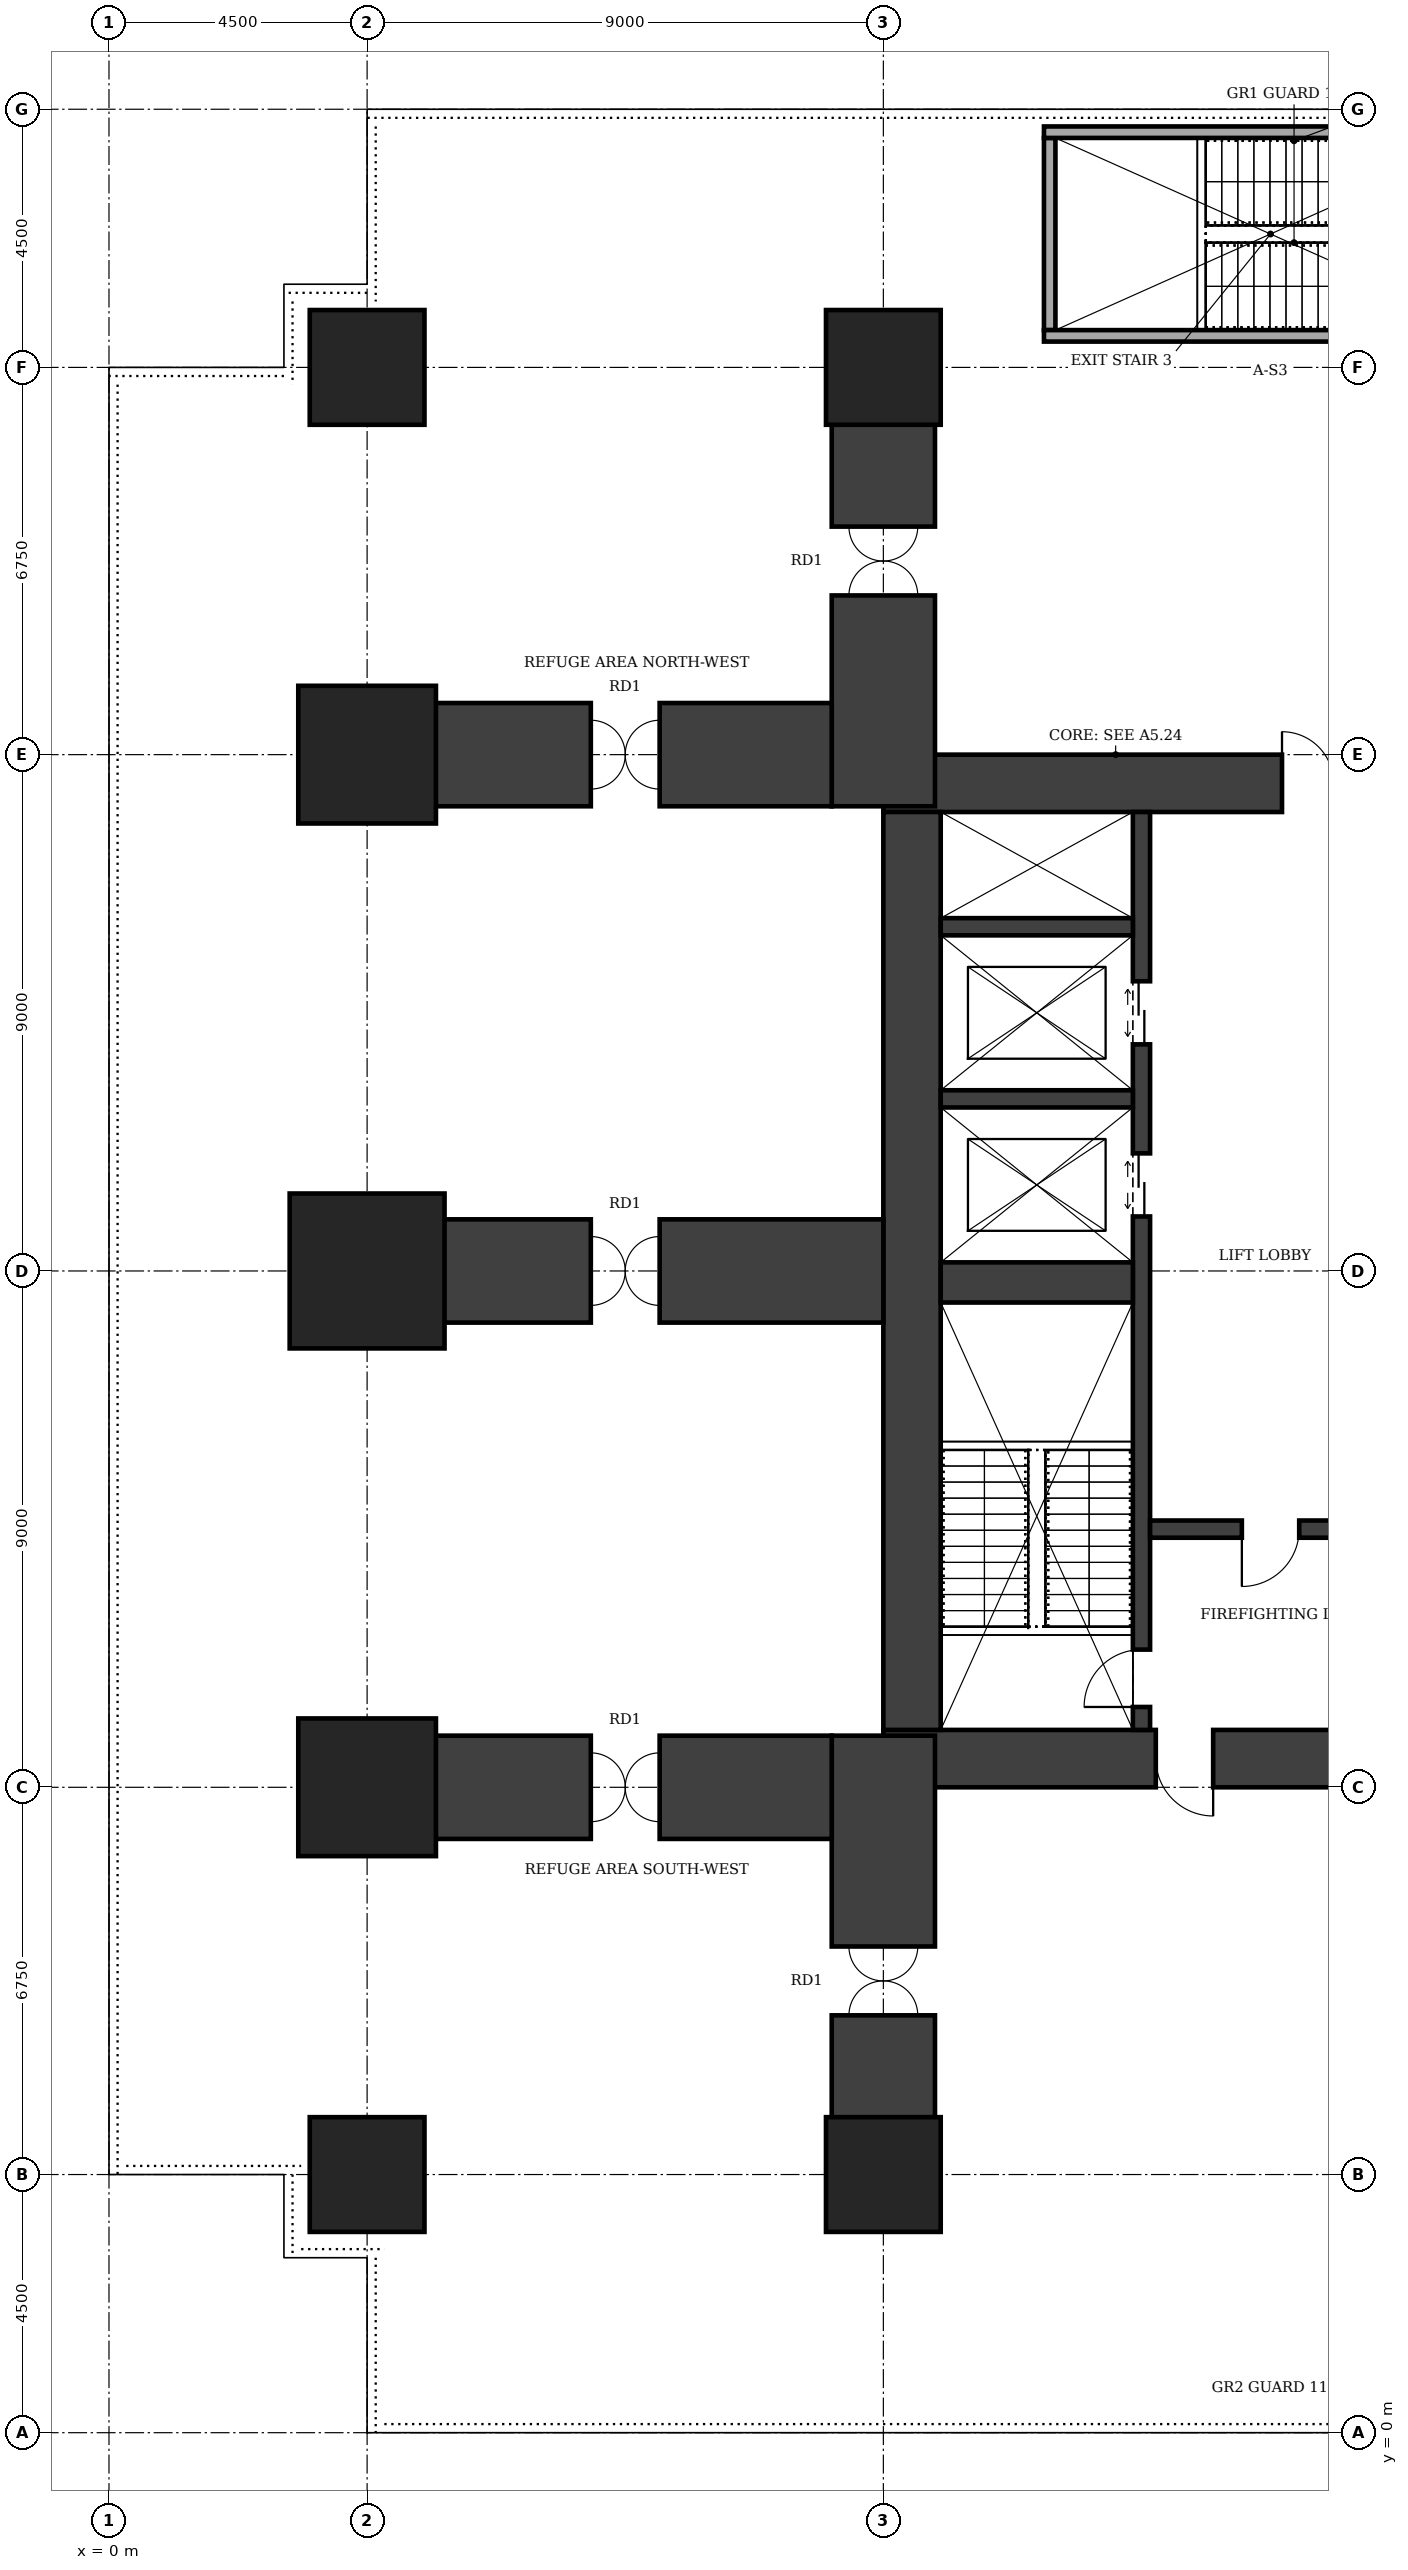
"""IFC4 building model, lengths in metres.
Left out: names, types, materials, properties, quantities, classifications, styles, units other than length and angle.
Written with IfcOpenShell. Run it as: python <this file> out.ifc"""

import sys

from ifc_helpers import new_model, si_unit, direction, frame, frame_2d, origin, origin_2d, place, context, subcontext, project, spatial, rectangle, extrude, element, fill, save


model = new_model("IFC4")
c1 = context("Model", 3, precision=1e-05, world=origin(), true_north=direction((0.0, 1.0)))
c2 = subcontext(c1, "Body", "Model", "MODEL_VIEW")
j1 = project(units=[si_unit("LENGTHUNIT", "METRE"), si_unit("PLANEANGLEUNIT", "RADIAN")], contexts=[c1])
p1 = place(None, origin())
s1 = spatial("IfcSite", under=j1, at=p1, CompositionType="ELEMENT")
p2 = place(p1, origin())
s2 = spatial("IfcBuilding", under=s1, at=p2, CompositionType="ELEMENT")
p3 = place(p2, frame((0.0, 0.0, 77.0)))
s3 = spatial("IfcBuildingStorey", under=s2, at=p3, CompositionType="ELEMENT", Elevation=77.0)
p4 = place(p3, frame((13.5, 11.75, 0.0), z_axis=(0.0, 0.0, 1.0), x_axis=(1.0, 0.0, 0.0)))
e1 = element("IfcWall", 1, at=p4, inside=s3, PredefinedType="SHEAR", context=c2, shape_type="SweptSolid", body=[
    extrude(rectangle(XDim=13.5, YDim=1.0, at=frame_2d((6.75, 0.0))), origin(), (0.0, 0.0, 1.0), 8.0),
])
p5 = place(p4, frame((4.75, 0.0, 0.0)))
e2 = element("IfcOpeningElement", 2, at=p5, cuts=e1, PredefinedType="OPENING", context=c2, shape_type="SweptSolid", body=[
    extrude(rectangle(XDim=1.0, YDim=2.1, at=frame_2d((0.5, 1.05))), frame((0.0, 0.51, 0.0), z_axis=(0.0, -1.0, 0.0), x_axis=(1.0, 0.0, 0.0)), (0.0, 0.0, 1.0), 1.02),
])
p6 = place(p3, frame((27.0, 28.75, 0.0), z_axis=(0.0, 0.0, 1.0), x_axis=(-1.0, 0.0, 0.0)))
e3 = element("IfcWall", 3, at=p6, inside=s3, PredefinedType="SHEAR", context=c2, shape_type="SweptSolid", body=[
    extrude(rectangle(XDim=13.5, YDim=1.0, at=frame_2d((6.75, 0.0))), origin(), (0.0, 0.0, 1.0), 8.0),
])
p7 = place(p6, frame((4.75, 0.0, 0.0)))
e4 = element("IfcOpeningElement", 4, at=p7, cuts=e3, PredefinedType="OPENING", context=c2, shape_type="SweptSolid", body=[
    extrude(rectangle(XDim=1.8, YDim=2.1, at=frame_2d((0.9, 1.05))), frame((0.0, 0.51, 0.0), z_axis=(0.0, -1.0, 0.0), x_axis=(1.0, 0.0, 0.0)), (0.0, 0.0, 1.0), 1.02),
])
p8 = place(p3, frame((14.0, 28.25, 0.0), z_axis=(0.0, 0.0, 1.0), x_axis=(0.0, -1.0, 0.0)))
e5 = element("IfcWall", 5, at=p8, inside=s3, PredefinedType="SHEAR", context=c2, shape_type="SweptSolid", body=[
    extrude(rectangle(XDim=16.0, YDim=1.0, at=frame_2d((8.0, 0.0))), origin(), (0.0, 0.0, 1.0), 8.0),
])
p9 = place(p3, frame((18.0, 12.25, 0.0), z_axis=(0.0, 0.0, 1.0), x_axis=(0.0, 1.0, 0.0)))
e6 = element("IfcWall", 6, at=p9, inside=s3, PredefinedType="SHEAR", context=c2, shape_type="SweptSolid", body=[
    extrude(rectangle(XDim=16.0, YDim=0.3, at=frame_2d((8.0, 0.0))), origin(), (0.0, 0.0, 1.0), 8.0),
])
p10 = place(p9, frame((0.4, 0.0, 0.0)))
e7 = element("IfcOpeningElement", 7, at=p10, cuts=e6, PredefinedType="OPENING", context=c2, shape_type="SweptSolid", body=[
    extrude(rectangle(XDim=1.0, YDim=2.1, at=frame_2d((0.5, 1.05))), frame((0.0, 0.16, 0.0), z_axis=(0.0, -1.0, 0.0), x_axis=(1.0, 0.0, 0.0)), (0.0, 0.0, 1.0), 0.32),
])
p11 = place(p9, frame((8.95, 0.0, 0.0)))
e8 = element("IfcOpeningElement", 8, at=p11, cuts=e6, PredefinedType="OPENING", context=c2, shape_type="SweptSolid", body=[
    extrude(rectangle(XDim=1.1, YDim=2.1, at=frame_2d((0.55, 1.05))), frame((0.0, 0.16, 0.0), z_axis=(0.0, -1.0, 0.0), x_axis=(1.0, 0.0, 0.0)), (0.0, 0.0, 1.0), 0.32),
])
p12 = place(p9, frame((11.95, 0.0, 0.0)))
e9 = element("IfcOpeningElement", 9, at=p12, cuts=e6, PredefinedType="OPENING", context=c2, shape_type="SweptSolid", body=[
    extrude(rectangle(XDim=1.1, YDim=2.1, at=frame_2d((0.55, 1.05))), frame((0.0, 0.16, 0.0), z_axis=(0.0, -1.0, 0.0), x_axis=(1.0, 0.0, 0.0)), (0.0, 0.0, 1.0), 0.32),
])
p13 = place(p3, frame((14.5, 20.05, 0.0), z_axis=(0.0, 0.0, 1.0), x_axis=(1.0, 0.0, 0.0)))
e10 = element("IfcWall", 10, at=p13, inside=s3, PredefinedType="SHEAR", context=c2, shape_type="SweptSolid", body=[
    extrude(rectangle(XDim=3.35, YDim=0.7, at=frame_2d((1.675, 0.0))), origin(), (0.0, 0.0, 1.0), 8.0),
])
p14 = place(p3, frame((18.15, 15.75, 0.0), z_axis=(0.0, 0.0, 1.0), x_axis=(1.0, 0.0, 0.0)))
e11 = element("IfcWall", 11, at=p14, inside=s3, PredefinedType="SHEAR", context=c2, shape_type="SweptSolid", body=[
    extrude(rectangle(XDim=4.2, YDim=0.3, at=frame_2d((2.1, 0.0))), origin(), (0.0, 0.0, 1.0), 8.0),
])
p15 = place(p14, frame((1.6, 0.0, 0.0)))
e12 = element("IfcOpeningElement", 12, at=p15, cuts=e11, PredefinedType="OPENING", context=c2, shape_type="SweptSolid", body=[
    extrude(rectangle(XDim=1.0, YDim=2.1, at=frame_2d((0.5, 1.05))), frame((0.0, 0.16, 0.0), z_axis=(0.0, -1.0, 0.0), x_axis=(1.0, 0.0, 0.0)), (0.0, 0.0, 1.0), 0.32),
])
for number, where, z_axis, x_axis in (
    (13, (14.5, 23.25, 0.0), (0.0, 0.0, 1.0), (1.0, 0.0, 0.0)),
    (14, (14.5, 26.25, 0.0), (0.0, 0.0, 1.0), (1.0, 0.0, 0.0)),
):
    element("IfcWall", number, at=place(p3, frame(where, z_axis=z_axis, x_axis=x_axis)), inside=s3, PredefinedType="SHEAR", context=c2, shape_type="SweptSolid", body=[
        extrude(rectangle(XDim=3.35, YDim=0.3, at=frame_2d((1.675, 0.0))), origin(), (0.0, 0.0, 1.0), 8.0),
    ])
for number, where, z_axis, x_axis in (
    (15, (4.5, 4.5, 0.0), (0.0, 0.0, 1.0), (1.0, 0.0, 0.0)),
    (16, (13.5, 4.5, 0.0), (0.0, 0.0, 1.0), (1.0, 0.0, 0.0)),
):
    element("IfcColumn", number, at=place(p3, frame(where, z_axis=z_axis, x_axis=x_axis)), inside=s3, PredefinedType="COLUMN", context=c2, shape_type="SweptSolid", body=[
        extrude(rectangle(XDim=2.0, YDim=2.0, at=origin_2d()), origin(), (0.0, 0.0, 1.0), 8.0),
    ])
p16 = place(p3, frame((4.5, 11.25, 0.0), z_axis=(0.0, 0.0, 1.0), x_axis=(1.0, 0.0, 0.0)))
e17 = element("IfcColumn", 17, at=p16, inside=s3, PredefinedType="COLUMN", context=c2, shape_type="SweptSolid", body=[
    extrude(rectangle(XDim=2.4, YDim=2.4, at=origin_2d()), origin(), (0.0, 0.0, 1.0), 8.0),
])
p17 = place(p3, frame((4.5, 20.25, 0.0), z_axis=(0.0, 0.0, 1.0), x_axis=(1.0, 0.0, 0.0)))
e18 = element("IfcColumn", 18, at=p17, inside=s3, PredefinedType="COLUMN", context=c2, shape_type="SweptSolid", body=[
    extrude(rectangle(XDim=2.7, YDim=2.7, at=origin_2d()), origin(), (0.0, 0.0, 1.0), 8.0),
])
p18 = place(p3, frame((4.5, 29.25, 0.0), z_axis=(0.0, 0.0, 1.0), x_axis=(1.0, 0.0, 0.0)))
e19 = element("IfcColumn", 19, at=p18, inside=s3, PredefinedType="COLUMN", context=c2, shape_type="SweptSolid", body=[
    extrude(rectangle(XDim=2.4, YDim=2.4, at=origin_2d()), origin(), (0.0, 0.0, 1.0), 8.0),
])
for number, where, z_axis, x_axis in (
    (20, (4.5, 36.0, 0.0), (0.0, 0.0, 1.0), (1.0, 0.0, 0.0)),
    (21, (13.5, 36.0, 0.0), (0.0, 0.0, 1.0), (1.0, 0.0, 0.0)),
):
    element("IfcColumn", number, at=place(p3, frame(where, z_axis=z_axis, x_axis=x_axis)), inside=s3, PredefinedType="COLUMN", context=c2, shape_type="SweptSolid", body=[
        extrude(rectangle(XDim=2.0, YDim=2.0, at=origin_2d()), origin(), (0.0, 0.0, 1.0), 8.0),
    ])
p19 = place(p3, frame((13.5, 4.5, 0.0), z_axis=(0.0, 0.0, 1.0), x_axis=(0.0, 1.0, 0.0)))
e22 = element("IfcWall", 22, at=p19, inside=s3, PredefinedType="SHEAR", context=c2, shape_type="SweptSolid", body=[
    extrude(rectangle(XDim=7.65, YDim=1.8, at=frame_2d((3.825, 0.0))), origin(), (0.0, 0.0, 1.0), 8.0),
])
p20 = place(p19, frame((2.775, 0.0, 0.0)))
e23 = element("IfcOpeningElement", 23, at=p20, cuts=e22, PredefinedType="OPENING", context=c2, shape_type="SweptSolid", body=[
    extrude(rectangle(XDim=1.2, YDim=2.1, at=frame_2d((0.6, 1.05))), frame((0.0, 0.91, 0.0), z_axis=(0.0, -1.0, 0.0), x_axis=(1.0, 0.0, 0.0)), (0.0, 0.0, 1.0), 1.82),
])
p21 = place(p3, frame((13.5, 28.35, 0.0), z_axis=(0.0, 0.0, 1.0), x_axis=(0.0, 1.0, 0.0)))
e24 = element("IfcWall", 24, at=p21, inside=s3, PredefinedType="SHEAR", context=c2, shape_type="SweptSolid", body=[
    extrude(rectangle(XDim=7.65, YDim=1.8, at=frame_2d((3.825, 0.0))), origin(), (0.0, 0.0, 1.0), 8.0),
])
p22 = place(p21, frame((3.675, 0.0, 0.0)))
e25 = element("IfcOpeningElement", 25, at=p22, cuts=e24, PredefinedType="OPENING", context=c2, shape_type="SweptSolid", body=[
    extrude(rectangle(XDim=1.2, YDim=2.1, at=frame_2d((0.6, 1.05))), frame((0.0, 0.91, 0.0), z_axis=(0.0, -1.0, 0.0), x_axis=(1.0, 0.0, 0.0)), (0.0, 0.0, 1.0), 1.82),
])
p23 = place(p3, frame((4.5, 20.25, 0.0), z_axis=(0.0, 0.0, 1.0), x_axis=(1.0, 0.0, 0.0)))
e26 = element("IfcWall", 26, at=p23, inside=s3, PredefinedType="SHEAR", context=c2, shape_type="SweptSolid", body=[
    extrude(rectangle(XDim=9.0, YDim=1.8, at=frame_2d((4.5, 0.0))), origin(), (0.0, 0.0, 1.0), 8.0),
])
p24 = place(p23, frame((3.9, 0.0, 0.0)))
e27 = element("IfcOpeningElement", 27, at=p24, cuts=e26, PredefinedType="OPENING", context=c2, shape_type="SweptSolid", body=[
    extrude(rectangle(XDim=1.2, YDim=2.1, at=frame_2d((0.6, 1.05))), frame((0.0, 0.91, 0.0), z_axis=(0.0, -1.0, 0.0), x_axis=(1.0, 0.0, 0.0)), (0.0, 0.0, 1.0), 1.82),
])
p25 = place(p3, frame((4.5, 11.25, 0.0), z_axis=(0.0, 0.0, 1.0), x_axis=(1.0, 0.0, 0.0)))
e28 = element("IfcWall", 28, at=p25, inside=s3, PredefinedType="SHEAR", context=c2, shape_type="SweptSolid", body=[
    extrude(rectangle(XDim=8.1, YDim=1.8, at=frame_2d((4.05, 0.0))), origin(), (0.0, 0.0, 1.0), 8.0),
])
p26 = place(p25, frame((3.9, 0.0, 0.0)))
e29 = element("IfcOpeningElement", 29, at=p26, cuts=e28, PredefinedType="OPENING", context=c2, shape_type="SweptSolid", body=[
    extrude(rectangle(XDim=1.2, YDim=2.1, at=frame_2d((0.6, 1.05))), frame((0.0, 0.91, 0.0), z_axis=(0.0, -1.0, 0.0), x_axis=(1.0, 0.0, 0.0)), (0.0, 0.0, 1.0), 1.82),
])
p27 = place(p3, frame((4.5, 29.25, 0.0), z_axis=(0.0, 0.0, 1.0), x_axis=(1.0, 0.0, 0.0)))
e30 = element("IfcWall", 30, at=p27, inside=s3, PredefinedType="SHEAR", context=c2, shape_type="SweptSolid", body=[
    extrude(rectangle(XDim=8.1, YDim=1.8, at=frame_2d((4.05, 0.0))), origin(), (0.0, 0.0, 1.0), 8.0),
])
p28 = place(p27, frame((3.9, 0.0, 0.0)))
e31 = element("IfcOpeningElement", 31, at=p28, cuts=e30, PredefinedType="OPENING", context=c2, shape_type="SweptSolid", body=[
    extrude(rectangle(XDim=1.2, YDim=2.1, at=frame_2d((0.6, 1.05))), frame((0.0, 0.91, 0.0), z_axis=(0.0, -1.0, 0.0), x_axis=(1.0, 0.0, 0.0)), (0.0, 0.0, 1.0), 1.82),
])
for number, where, z_axis, x_axis in (
    (32, (16.3, 36.55, 0.0), (0.0, 0.0, 1.0), (1.0, 0.0, 0.0)),
    (33, (16.3, 40.1, 0.0), (0.0, 0.0, 1.0), (1.0, 0.0, 0.0)),
):
    element("IfcWall", number, at=place(p3, frame(where, z_axis=z_axis, x_axis=x_axis)), inside=s3, PredefinedType="SOLIDWALL", context=c2, shape_type="SweptSolid", body=[
        extrude(rectangle(XDim=7.9, YDim=0.2, at=frame_2d((3.95, 0.0))), origin(), (0.0, 0.0, 1.0), 7.75),
    ])
p29 = place(p3, frame((16.4, 36.65, 0.0), z_axis=(0.0, 0.0, 1.0), x_axis=(0.0, 1.0, 0.0)))
e34 = element("IfcWall", 34, at=p29, inside=s3, PredefinedType="SOLIDWALL", context=c2, shape_type="SweptSolid", body=[
    extrude(rectangle(XDim=3.35, YDim=0.2, at=frame_2d((1.675, 0.0))), origin(), (0.0, 0.0, 1.0), 7.75),
])
p30 = place(p5, frame((1.0, 0.0, 0.0), z_axis=(0.0, 0.0, 1.0), x_axis=(-1.0, 0.0, 0.0)))
e35 = element("IfcDoor", 35, at=p30, inside=s3, OperationType="SINGLE_SWING_LEFT", PredefinedType="DOOR", context=c2, shape_type="SweptSolid", body=[
    extrude(rectangle(XDim=1.0, YDim=2.1, at=frame_2d((0.5, 1.05))), frame((0.0, 0.025, 0.0), z_axis=(0.0, -1.0, 0.0), x_axis=(1.0, 0.0, 0.0)), (0.0, 0.0, 1.0), 0.05),
])
fill(e2, e35)
p31 = place(p7, frame((1.8, 0.0, 0.0), z_axis=(0.0, 0.0, 1.0), x_axis=(-1.0, 0.0, 0.0)))
e36 = element("IfcDoor", 36, at=p31, inside=s3, OperationType="DOUBLE_DOOR_SINGLE_SWING", PredefinedType="DOOR", context=c2, shape_type="SweptSolid", body=[
    extrude(rectangle(XDim=1.8, YDim=2.1, at=frame_2d((0.9, 1.05))), frame((0.0, 0.025, 0.0), z_axis=(0.0, -1.0, 0.0), x_axis=(1.0, 0.0, 0.0)), (0.0, 0.0, 1.0), 0.05),
])
fill(e4, e36)
p32 = place(p15, frame((1.0, 0.0, 0.0), z_axis=(0.0, 0.0, 1.0), x_axis=(-1.0, 0.0, 0.0)))
e37 = element("IfcDoor", 37, at=p32, inside=s3, OperationType="SINGLE_SWING_RIGHT", PredefinedType="DOOR", context=c2, shape_type="SweptSolid", body=[
    extrude(rectangle(XDim=1.0, YDim=2.1, at=frame_2d((0.5, 1.05))), frame((0.0, 0.025, 0.0), z_axis=(0.0, -1.0, 0.0), x_axis=(1.0, 0.0, 0.0)), (0.0, 0.0, 1.0), 0.05),
])
fill(e12, e37)
p33 = place(p10, origin())
e38 = element("IfcDoor", 38, at=p33, inside=s3, OperationType="SINGLE_SWING_LEFT", PredefinedType="DOOR", context=c2, shape_type="SweptSolid", body=[
    extrude(rectangle(XDim=1.0, YDim=2.1, at=frame_2d((0.5, 1.05))), frame((0.0, 0.025, 0.0), z_axis=(0.0, -1.0, 0.0), x_axis=(1.0, 0.0, 0.0)), (0.0, 0.0, 1.0), 0.05),
])
fill(e7, e38)
p34 = place(p11, origin())
e39 = element("IfcDoor", 39, at=p34, inside=s3, OperationType="DOUBLE_DOOR_SLIDING", PredefinedType="DOOR", context=c2, shape_type="SweptSolid", body=[
    extrude(rectangle(XDim=1.1, YDim=2.1, at=frame_2d((0.55, 1.05))), frame((0.0, 0.025, 0.0), z_axis=(0.0, -1.0, 0.0), x_axis=(1.0, 0.0, 0.0)), (0.0, 0.0, 1.0), 0.05),
])
fill(e8, e39)
p35 = place(p12, origin())
e40 = element("IfcDoor", 40, at=p35, inside=s3, OperationType="DOUBLE_DOOR_SLIDING", PredefinedType="DOOR", context=c2, shape_type="SweptSolid", body=[
    extrude(rectangle(XDim=1.1, YDim=2.1, at=frame_2d((0.55, 1.05))), frame((0.0, 0.025, 0.0), z_axis=(0.0, -1.0, 0.0), x_axis=(1.0, 0.0, 0.0)), (0.0, 0.0, 1.0), 0.05),
])
fill(e9, e40)
p36 = place(p20, origin())
e41 = element("IfcDoor", 41, at=p36, inside=s3, OperationType="DOUBLE_DOOR_DOUBLE_SWING", PredefinedType="DOOR", context=c2, shape_type="SweptSolid", body=[
    extrude(rectangle(XDim=1.2, YDim=2.1, at=frame_2d((0.6, 1.05))), frame((0.0, 0.025, 0.0), z_axis=(0.0, -1.0, 0.0), x_axis=(1.0, 0.0, 0.0)), (0.0, 0.0, 1.0), 0.05),
])
fill(e23, e41)
p37 = place(p22, origin())
e42 = element("IfcDoor", 42, at=p37, inside=s3, OperationType="DOUBLE_DOOR_DOUBLE_SWING", PredefinedType="DOOR", context=c2, shape_type="SweptSolid", body=[
    extrude(rectangle(XDim=1.2, YDim=2.1, at=frame_2d((0.6, 1.05))), frame((0.0, 0.025, 0.0), z_axis=(0.0, -1.0, 0.0), x_axis=(1.0, 0.0, 0.0)), (0.0, 0.0, 1.0), 0.05),
])
fill(e25, e42)
p38 = place(p24, origin())
e43 = element("IfcDoor", 43, at=p38, inside=s3, OperationType="DOUBLE_DOOR_DOUBLE_SWING", PredefinedType="DOOR", context=c2, shape_type="SweptSolid", body=[
    extrude(rectangle(XDim=1.2, YDim=2.1, at=frame_2d((0.6, 1.05))), frame((0.0, 0.025, 0.0), z_axis=(0.0, -1.0, 0.0), x_axis=(1.0, 0.0, 0.0)), (0.0, 0.0, 1.0), 0.05),
])
fill(e27, e43)
p39 = place(p26, origin())
e44 = element("IfcDoor", 44, at=p39, inside=s3, OperationType="DOUBLE_DOOR_DOUBLE_SWING", PredefinedType="DOOR", context=c2, shape_type="SweptSolid", body=[
    extrude(rectangle(XDim=1.2, YDim=2.1, at=frame_2d((0.6, 1.05))), frame((0.0, 0.025, 0.0), z_axis=(0.0, -1.0, 0.0), x_axis=(1.0, 0.0, 0.0)), (0.0, 0.0, 1.0), 0.05),
])
fill(e29, e44)
p40 = place(p28, origin())
e45 = element("IfcDoor", 45, at=p40, inside=s3, OperationType="DOUBLE_DOOR_DOUBLE_SWING", PredefinedType="DOOR", context=c2, shape_type="SweptSolid", body=[
    extrude(rectangle(XDim=1.2, YDim=2.1, at=frame_2d((0.6, 1.05))), frame((0.0, 0.025, 0.0), z_axis=(0.0, -1.0, 0.0), x_axis=(1.0, 0.0, 0.0)), (0.0, 0.0, 1.0), 0.05),
])
fill(e31, e45)
save(model, sys.argv[1])
